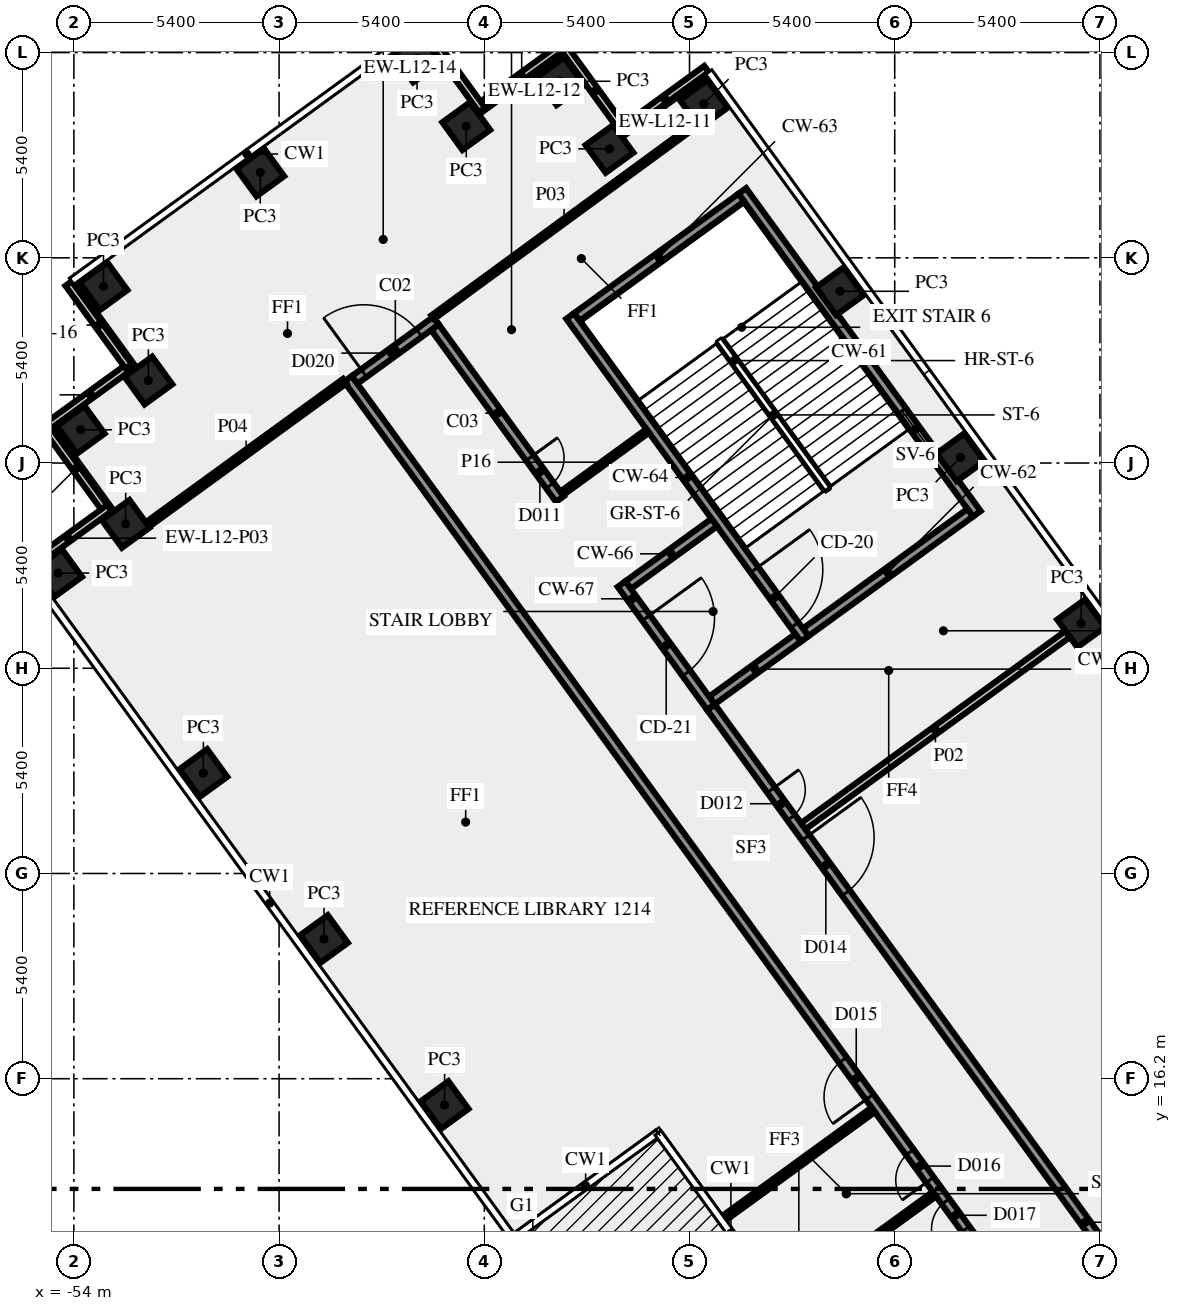
"""IFC4 building model, lengths in metres.
Left out: names, types, materials, properties, quantities, classifications, styles, units other than length and angle.
Written with IfcOpenShell. Run it as: python <this file> out.ifc"""

import sys

from ifc_helpers import new_model, si_unit, direction, frame, frame_2d, origin, origin_2d, place, context, subcontext, project, spatial, rectangle, extrude, element, fill, save


model = new_model("IFC4")
c1 = context("Model", 3, precision=1e-05, world=origin(), true_north=direction((0.0, 1.0)))
c2 = subcontext(c1, "Body", "Model", "MODEL_VIEW")
j1 = project(units=[si_unit("LENGTHUNIT", "METRE"), si_unit("PLANEANGLEUNIT", "RADIAN")], contexts=[c1])
p1 = place(None, origin())
s1 = spatial("IfcSite", under=j1, at=p1, CompositionType="ELEMENT")
p2 = place(p1, origin())
s2 = spatial("IfcBuilding", under=s1, at=p2, CompositionType="ELEMENT")
p3 = place(p2, frame((0.0, 0.0, 55.0)))
s3 = spatial("IfcBuildingStorey", under=s2, at=p3, CompositionType="ELEMENT", Elevation=55.0)
for number, where, z_axis, x_axis in (
    (1, (-27.495, 28.181, 0.0), (0.0, 0.0, 1.0), (-0.588, 0.809, 0.0)),
    (2, (-30.669, 32.55, 0.0), (0.0, 0.0, 1.0), (-0.588, 0.809, 0.0)),
    (3, (-33.843, 36.919, 0.0), (0.0, 0.0, 1.0), (-0.588, 0.809, 0.0)),
    (4, (-37.425, 41.85, 0.0), (0.0, 0.0, 1.0), (-0.588, 0.809, 0.0)),
    (5, (-39.906, 40.666, 0.0), (0.0, 0.0, 1.0), (-0.588, 0.809, 0.0)),
    (6, (-41.2, 42.445, 0.0), (0.0, 0.0, 1.0), (-0.588, 0.809, 0.0)),
    (7, (-43.675, 41.265, 0.0), (0.0, 0.0, 1.0), (-0.809, -0.588, 0.0)),
    (8, (-44.97, 43.045, 0.0), (0.0, 0.0, 1.0), (-0.809, -0.588, 0.0)),
    (9, (-49.096, 40.047, 0.0), (0.0, 0.0, 1.0), (-0.809, -0.588, 0.0)),
    (10, (-53.22, 37.05, 0.0), (0.0, 0.0, 1.0), (0.588, -0.809, 0.0)),
    (11, (-52.039, 34.571, 0.0), (0.0, 0.0, 1.0), (-0.809, -0.588, 0.0)),
    (12, (-53.82, 33.275, 0.0), (0.0, 0.0, 1.0), (0.588, -0.809, 0.0)),
    (13, (-52.636, 30.8, 0.0), (0.0, 0.0, 1.0), (-0.809, -0.588, 0.0)),
    (14, (-54.415, 29.505, 0.0), (0.0, 0.0, 1.0), (0.588, -0.809, 0.0)),
    (15, (-50.592, 24.243, 0.0), (0.0, 0.0, 1.0), (0.588, -0.809, 0.0)),
    (16, (-47.418, 19.875, 0.0), (0.0, 0.0, 1.0), (0.588, -0.809, 0.0)),
    (17, (-44.244, 15.506, 0.0), (0.0, 0.0, 1.0), (0.588, -0.809, 0.0)),
):
    element("IfcColumn", number, at=place(p3, frame(where, z_axis=z_axis, x_axis=x_axis)), inside=s3, PredefinedType="COLUMN", context=c2, shape_type="SweptSolid", body=[
        extrude(rectangle(XDim=0.9, YDim=0.9, at=origin_2d()), origin(), (0.0, 0.0, 1.0), 3.65),
    ])
p4 = place(p3, frame((-52.465, 34.987, 0.0), z_axis=(0.0, 0.0, 1.0), x_axis=(-0.809033161865, -0.587762999008, 0.0)))
e18 = element("IfcWall", 18, at=p4, inside=s3, PredefinedType="SOLIDWALL", context=c2, shape_type="SweptSolid", body=[
    extrude(rectangle(XDim=2.7, YDim=0.2, at=frame_2d((1.35, 0.0))), origin(), (0.0, 0.0, 1.0), 3.65),
])
p5 = place(p3, frame((-54.738, 33.351, 0.0), z_axis=(0.0, 0.0, 1.0), x_axis=(0.587779184282, -0.809021403008, 0.0)))
e19 = element("IfcWall", 19, at=p5, inside=s3, PredefinedType="SOLIDWALL", context=c2, shape_type="SweptSolid", body=[
    extrude(rectangle(XDim=2.7, YDim=0.2, at=frame_2d((1.35, 0.0))), origin(), (0.0, 0.0, 1.0), 3.65),
])
for number, where, z_axis, x_axis in (
    (20, (-53.063, 31.216, 0.0), (0.0, 0.0, 1.0), (-0.809, -0.588, 0.0)),
    (21, (-37.353, 42.768, 0.0), (0.0, 0.0, 1.0), (-0.809, -0.588, 0.0)),
):
    element("IfcWall", number, at=place(p3, frame(where, z_axis=z_axis, x_axis=x_axis)), inside=s3, PredefinedType="SOLIDWALL", context=c2, shape_type="SweptSolid", body=[
        extrude(rectangle(XDim=2.7, YDim=0.2, at=frame_2d((1.35, 0.0))), origin(), (0.0, 0.0, 1.0), 3.65),
    ])
p6 = place(p3, frame((-39.488, 41.094, 0.0), z_axis=(0.0, 0.0, 1.0), x_axis=(-0.587806000234, 0.809001919707, 0.0)))
e22 = element("IfcWall", 22, at=p6, inside=s3, PredefinedType="SOLIDWALL", context=c2, shape_type="SweptSolid", body=[
    extrude(rectangle(XDim=2.7, YDim=0.2, at=frame_2d((1.35, 0.0))), origin(), (0.0, 0.0, 1.0), 3.65),
])
for number, where, z_axis, x_axis in (
    (23, (-41.124, 43.366, 0.0), (0.0, 0.0, 1.0), (-0.809, -0.588, 0.0)),
    (24, (-43.259, 41.691, 0.0), (0.0, 0.0, 1.0), (-0.588, 0.809, 0.0)),
    (25, (-54.14, 37.123, 0.0), (0.0, 0.0, 1.0), (0.588, -0.809, 0.0)),
):
    element("IfcWall", number, at=place(p3, frame(where, z_axis=z_axis, x_axis=x_axis)), inside=s3, PredefinedType="SOLIDWALL", context=c2, shape_type="SweptSolid", body=[
        extrude(rectangle(XDim=2.7, YDim=0.2, at=frame_2d((1.35, 0.0))), origin(), (0.0, 0.0, 1.0), 3.65),
    ])
p7 = place(p3, frame((-30.24, 31.064, 0.0), z_axis=(0.0, 0.0, 1.0), x_axis=(-0.587795589702, 0.809009483706, 0.0)))
e26 = element("IfcWall", 26, at=p7, inside=s3, PredefinedType="SHEAR", context=c2, shape_type="SweptSolid", body=[
    extrude(rectangle(XDim=10.5, YDim=0.25, at=frame_2d((5.25, 0.0))), origin(), (0.0, 0.0, 1.0), 3.65),
])
p8 = place(p7, frame((2.15, 0.0, 1.0)))
e27 = element("IfcOpeningElement", 27, at=p8, cuts=e26, PredefinedType="OPENING", context=c2, shape_type="SweptSolid", body=[
    extrude(rectangle(XDim=1.2, YDim=1.2, at=frame_2d((0.6, 0.6))), frame((0.0, 0.135, 0.0), z_axis=(0.0, -1.0, 0.0), x_axis=(1.0, 0.0, 0.0)), (0.0, 0.0, 1.0), 0.27),
])
p9 = place(p3, frame((-30.414, 31.092, 0.0), z_axis=(0.0, 0.0, 1.0), x_axis=(-0.8089984606, -0.587810760999, 0.0)))
e28 = element("IfcWall", 28, at=p9, inside=s3, PredefinedType="SHEAR", context=c2, shape_type="SweptSolid", body=[
    extrude(rectangle(XDim=5.35, YDim=0.25, at=frame_2d((2.675, 0.0))), origin(), (0.0, 0.0, 1.0), 3.65),
])
p10 = place(p3, frame((-36.439, 39.384, 0.0), z_axis=(0.0, 0.0, 1.0), x_axis=(-0.809020161303, -0.587780893365, 0.0)))
e29 = element("IfcWall", 29, at=p10, inside=s3, PredefinedType="SHEAR", context=c2, shape_type="SweptSolid", body=[
    extrude(rectangle(XDim=5.35, YDim=0.25, at=frame_2d((2.675, 0.0))), origin(), (0.0, 0.0, 1.0), 3.65),
])
p11 = place(p3, frame((-40.942, 36.267, 0.0), z_axis=(0.0, 0.0, 1.0), x_axis=(0.587795589702, -0.809009483706, 0.0)))
e30 = element("IfcWall", 30, at=p11, inside=s3, PredefinedType="SHEAR", context=c2, shape_type="SweptSolid", body=[
    extrude(rectangle(XDim=10.5, YDim=0.25, at=frame_2d((5.25, 0.0))), origin(), (0.0, 0.0, 1.0), 3.65),
])
p12 = place(p11, frame((8.25, 0.0, 0.0)))
e31 = element("IfcOpeningElement", 31, at=p12, cuts=e30, PredefinedType="OPENING", context=c2, shape_type="SweptSolid", body=[
    extrude(rectangle(XDim=1.8, YDim=2.1, at=frame_2d((0.9, 1.05))), frame((0.0, 0.135, 0.0), z_axis=(0.0, -1.0, 0.0), x_axis=(1.0, 0.0, 0.0)), (0.0, 0.0, 1.0), 0.27),
])
for number, where, z_axis, x_axis in (
    (32, (-34.945, 27.8, 0.0), (0.0, 0.0, 1.0), (-0.809, -0.588, 0.0)),
    (33, (-37.149, 30.834, 0.0), (0.0, 0.0, 1.0), (-0.809, -0.588, 0.0)),
):
    element("IfcWall", number, at=place(p3, frame(where, z_axis=z_axis, x_axis=x_axis)), inside=s3, PredefinedType="SHEAR", context=c2, shape_type="SweptSolid", body=[
        extrude(rectangle(XDim=2.8, YDim=0.25, at=frame_2d((1.4, 0.0))), origin(), (0.0, 0.0, 1.0), 3.65),
    ])
p13 = place(p3, frame((-39.589, 29.216, 0.0), z_axis=(0.0, 0.0, 1.0), x_axis=(0.587772420479, -0.809026317077, 0.0)))
e34 = element("IfcWall", 34, at=p13, inside=s3, PredefinedType="SHEAR", context=c2, shape_type="SweptSolid", body=[
    extrude(rectangle(XDim=4.0, YDim=0.25, at=frame_2d((2.0, 0.0))), origin(), (0.0, 0.0, 1.0), 3.65),
])
p14 = place(p13, frame((1.1, 0.0, 0.0)))
e35 = element("IfcOpeningElement", 35, at=p14, cuts=e34, PredefinedType="OPENING", context=c2, shape_type="SweptSolid", body=[
    extrude(rectangle(XDim=1.8, YDim=2.1, at=frame_2d((0.9, 1.05))), frame((0.0, 0.135, 0.0), z_axis=(0.0, -1.0, 0.0), x_axis=(1.0, 0.0, 0.0)), (0.0, 0.0, 1.0), 0.27),
])
p15 = place(p3, frame((-20.531, -1.523, 0.0), z_axis=(0.0, 0.0, 1.0), x_axis=(-0.587784593204, 0.809017473231, 0.0)))
e36 = element("IfcWall", 36, at=p15, inside=s3, PredefinedType="SOLIDWALL", context=c2, shape_type="SweptSolid", body=[
    extrude(rectangle(XDim=44.67, YDim=0.25, at=frame_2d((22.335, 0.0))), origin(), (0.0, 0.0, 1.0), 3.65),
])
p16 = place(p15, frame((21.316, 0.0, 0.0)))
e37 = element("IfcOpeningElement", 37, at=p16, cuts=e36, PredefinedType="OPENING", context=c2, shape_type="SweptSolid", body=[
    extrude(rectangle(XDim=1.2, YDim=2.1, at=frame_2d((0.6, 1.05))), frame((0.0, 0.135, 0.0), z_axis=(0.0, -1.0, 0.0), x_axis=(1.0, 0.0, 0.0)), (0.0, 0.0, 1.0), 0.27),
])
p17 = place(p15, frame((17.015, 0.0, 0.0)))
e38 = element("IfcOpeningElement", 38, at=p17, cuts=e36, PredefinedType="OPENING", context=c2, shape_type="SweptSolid", body=[
    extrude(rectangle(XDim=0.9, YDim=2.1, at=frame_2d((0.45, 1.05))), frame((0.0, 0.135, 0.0), z_axis=(0.0, -1.0, 0.0), x_axis=(1.0, 0.0, 0.0)), (0.0, 0.0, 1.0), 0.27),
])
p18 = place(p15, frame((0.533, 0.0, 0.0)))
e39 = element("IfcOpeningElement", 39, at=p18, cuts=e36, PredefinedType="OPENING", context=c2, shape_type="SweptSolid", body=[
    extrude(rectangle(XDim=0.9, YDim=2.1, at=frame_2d((0.45, 1.05))), frame((0.0, 0.135, 0.0), z_axis=(0.0, -1.0, 0.0), x_axis=(1.0, 0.0, 0.0)), (0.0, 0.0, 1.0), 0.27),
])
p19 = place(p15, frame((18.616, 0.0, 0.0)))
e40 = element("IfcOpeningElement", 40, at=p19, cuts=e36, PredefinedType="OPENING", context=c2, shape_type="SweptSolid", body=[
    extrude(rectangle(XDim=0.9, YDim=2.1, at=frame_2d((0.45, 1.05))), frame((0.0, 0.135, 0.0), z_axis=(0.0, -1.0, 0.0), x_axis=(1.0, 0.0, 0.0)), (0.0, 0.0, 1.0), 0.27),
])
p20 = place(p15, frame((7.816, 0.0, 0.0)))
e41 = element("IfcOpeningElement", 41, at=p20, cuts=e36, PredefinedType="OPENING", context=c2, shape_type="SweptSolid", body=[
    extrude(rectangle(XDim=0.9, YDim=2.1, at=frame_2d((0.45, 1.05))), frame((0.0, 0.135, 0.0), z_axis=(0.0, -1.0, 0.0), x_axis=(1.0, 0.0, 0.0)), (0.0, 0.0, 1.0), 0.27),
])
p21 = place(p3, frame((-46.613, 34.588, 0.0), z_axis=(0.0, 0.0, 1.0), x_axis=(0.808994936898, 0.587815610607, 0.0)))
e42 = element("IfcWall", 42, at=p21, inside=s3, PredefinedType="SOLIDWALL", context=c2, shape_type="SweptSolid", body=[
    extrude(rectangle(XDim=2.65, YDim=0.25, at=frame_2d((1.325, 0.0))), origin(), (0.0, 0.0, 1.0), 3.65),
])
p22 = place(p21, frame((0.299, 0.0, 0.0)))
e43 = element("IfcOpeningElement", 43, at=p22, cuts=e42, PredefinedType="OPENING", context=c2, shape_type="SweptSolid", body=[
    extrude(rectangle(XDim=1.8, YDim=2.1, at=frame_2d((0.9, 1.05))), frame((0.0, 0.135, 0.0), z_axis=(0.0, -1.0, 0.0), x_axis=(1.0, 0.0, 0.0)), (0.0, 0.0, 1.0), 0.27),
])
p23 = place(p3, frame((-44.497, 35.971, 0.0), z_axis=(0.0, 0.0, 1.0), x_axis=(0.587742866856, -0.809047787501, 0.0)))
e44 = element("IfcWall", 44, at=p23, inside=s3, PredefinedType="SOLIDWALL", context=c2, shape_type="SweptSolid", body=[
    extrude(rectangle(XDim=5.586, YDim=0.25, at=frame_2d((2.793, 0.0))), origin(), (0.0, 0.0, 1.0), 3.65),
])
p24 = place(p23, frame((4.245, 0.0, 0.0)))
e45 = element("IfcOpeningElement", 45, at=p24, cuts=e44, PredefinedType="OPENING", context=c2, shape_type="SweptSolid", body=[
    extrude(rectangle(XDim=0.9, YDim=2.1, at=frame_2d((0.45, 1.05))), frame((0.0, 0.135, 0.0), z_axis=(0.0, -1.0, 0.0), x_axis=(1.0, 0.0, 0.0)), (0.0, 0.0, 1.0), 0.27),
])
p25 = place(p3, frame((-37.232, 25.972, 0.0), z_axis=(0.0, 0.0, 1.0), x_axis=(0.587786323093, -0.809016216391, 0.0)))
e46 = element("IfcWall", 46, at=p25, inside=s3, PredefinedType="SOLIDWALL", context=c2, shape_type="SweptSolid", body=[
    extrude(rectangle(XDim=33.493, YDim=0.25, at=frame_2d((16.747, 0.0))), origin(), (0.0, 0.0, 1.0), 3.65),
])
p26 = place(p25, frame((28.301, 0.0, 0.0)))
e47 = element("IfcOpeningElement", 47, at=p26, cuts=e46, PredefinedType="OPENING", context=c2, shape_type="SweptSolid", body=[
    extrude(rectangle(XDim=1.8, YDim=2.1, at=frame_2d((0.9, 1.05))), frame((0.0, 0.135, 0.0), z_axis=(0.0, -1.0, 0.0), x_axis=(1.0, 0.0, 0.0)), (0.0, 0.0, 1.0), 0.27),
])
p27 = place(p25, frame((4.235, 0.0, 0.0)))
e48 = element("IfcOpeningElement", 48, at=p27, cuts=e46, PredefinedType="OPENING", context=c2, shape_type="SweptSolid", body=[
    extrude(rectangle(XDim=1.8, YDim=2.1, at=frame_2d((0.9, 1.05))), frame((0.0, 0.135, 0.0), z_axis=(0.0, -1.0, 0.0), x_axis=(1.0, 0.0, 0.0)), (0.0, 0.0, 1.0), 0.27),
])
p28 = place(p25, frame((2.685, 0.0, 0.0)))
e49 = element("IfcOpeningElement", 49, at=p28, cuts=e46, PredefinedType="OPENING", context=c2, shape_type="SweptSolid", body=[
    extrude(rectangle(XDim=0.9, YDim=2.1, at=frame_2d((0.45, 1.05))), frame((0.0, 0.135, 0.0), z_axis=(0.0, -1.0, 0.0), x_axis=(1.0, 0.0, 0.0)), (0.0, 0.0, 1.0), 0.27),
])
p29 = place(p3, frame((-27.851, 27.897, 0.0), z_axis=(0.0, 0.0, 1.0), x_axis=(-0.809030728677, -0.587766348183, 0.0)))
e50 = element("IfcWall", 50, at=p29, inside=s3, PredefinedType="SOLIDWALL", context=c2, shape_type="SweptSolid", body=[
    extrude(rectangle(XDim=8.596, YDim=0.2, at=frame_2d((4.298, 0.0))), origin(), (0.0, 0.0, 1.0), 3.65),
])
p30 = place(p3, frame((-44.559, 36.235, 0.0), z_axis=(0.0, 0.0, 1.0), x_axis=(0.806949857155, 0.590619952286, 0.0)))
e51 = element("IfcWall", 51, at=p30, inside=s3, PredefinedType="PARTITIONING", context=c2, shape_type="SweptSolid", body=[
    extrude(rectangle(XDim=8.57, YDim=0.12, at=frame_2d((4.285, 0.0))), origin(), (0.0, 0.0, 1.0), 3.65),
])
p31 = place(p3, frame((-52.062, 30.783, 0.0), z_axis=(0.0, 0.0, 1.0), x_axis=(0.808992766665, 0.58781859743, 0.0)))
e52 = element("IfcWall", 52, at=p31, inside=s3, PredefinedType="PARTITIONING", context=c2, shape_type="SweptSolid", body=[
    extrude(rectangle(XDim=6.414, YDim=0.15, at=frame_2d((3.207, 0.0))), origin(), (0.0, 0.0, 1.0), 3.65),
])
p32 = place(p3, frame((-36.88, 12.539, 0.0), z_axis=(0.0, 0.0, 1.0), x_axis=(0.809072133835, 0.58770935185, 0.0)))
e53 = element("IfcWall", 53, at=p32, inside=s3, PredefinedType="PARTITIONING", context=c2, shape_type="SweptSolid", body=[
    extrude(rectangle(XDim=4.836, YDim=0.15, at=frame_2d((2.418, 0.0))), origin(), (0.0, 0.0, 1.0), 3.65),
])
p33 = place(p3, frame((-31.356, 13.164, 0.0), z_axis=(0.0, 0.0, 1.0), x_axis=(-0.809191339455, -0.587545212006, 0.0)))
e54 = element("IfcWall", 54, at=p33, inside=s3, PredefinedType="PARTITIONING", context=c2, shape_type="SweptSolid", body=[
    extrude(rectangle(XDim=4.937, YDim=0.15, at=frame_2d((2.468, 0.0))), origin(), (0.0, 0.0, 1.0), 3.65),
])
p34 = place(p3, frame((-41.166, 31.599, 0.0), z_axis=(0.0, 0.0, 1.0), x_axis=(0.809090262332, 0.587684394381, 0.0)))
e55 = element("IfcWall", 55, at=p34, inside=s3, PredefinedType="PARTITIONING", context=c2, shape_type="SweptSolid", body=[
    extrude(rectangle(XDim=2.801, YDim=0.12, at=frame_2d((1.4, 0.0))), origin(), (0.0, 0.0, 1.0), 3.65),
])
p35 = place(p8, origin())
e56 = element("IfcWindow", 56, at=p35, inside=s3, PartitioningType="SINGLE_PANEL", PredefinedType="WINDOW", context=c2, shape_type="SweptSolid", body=[
    extrude(rectangle(XDim=1.2, YDim=1.2, at=frame_2d((0.6, 0.6))), frame((0.0, 0.03, 0.0), z_axis=(0.0, -1.0, 0.0), x_axis=(1.0, 0.0, 0.0)), (0.0, 0.0, 1.0), 0.06),
])
fill(e27, e56)
p36 = place(p12, origin())
e57 = element("IfcDoor", 57, at=p36, inside=s3, OperationType="DOUBLE_DOOR_SINGLE_SWING", PredefinedType="DOOR", context=c2, shape_type="SweptSolid", body=[
    extrude(rectangle(XDim=1.8, YDim=2.1, at=frame_2d((0.9, 1.05))), frame((0.0, 0.025, 0.0), z_axis=(0.0, -1.0, 0.0), x_axis=(1.0, 0.0, 0.0)), (0.0, 0.0, 1.0), 0.05),
])
fill(e31, e57)
p37 = place(p14, origin())
e58 = element("IfcDoor", 58, at=p37, inside=s3, OperationType="DOUBLE_DOOR_SINGLE_SWING", PredefinedType="DOOR", context=c2, shape_type="SweptSolid", body=[
    extrude(rectangle(XDim=1.8, YDim=2.1, at=frame_2d((0.9, 1.05))), frame((0.0, 0.025, 0.0), z_axis=(0.0, -1.0, 0.0), x_axis=(1.0, 0.0, 0.0)), (0.0, 0.0, 1.0), 0.05),
])
fill(e35, e58)
p38 = place(p27, origin())
e59 = element("IfcDoor", 59, at=p38, inside=s3, OperationType="DOUBLE_DOOR_SINGLE_SWING", PredefinedType="DOOR", context=c2, shape_type="SweptSolid", body=[
    extrude(rectangle(XDim=1.8, YDim=2.1, at=frame_2d((0.9, 1.05))), frame((0.0, 0.025, 0.0), z_axis=(0.0, -1.0, 0.0), x_axis=(1.0, 0.0, 0.0)), (0.0, 0.0, 1.0), 0.05),
])
fill(e48, e59)
p39 = place(p22, origin())
e60 = element("IfcDoor", 60, at=p39, inside=s3, OperationType="DOUBLE_DOOR_SINGLE_SWING", PredefinedType="DOOR", context=c2, shape_type="SweptSolid", body=[
    extrude(rectangle(XDim=1.8, YDim=2.1, at=frame_2d((0.9, 1.05))), frame((0.0, 0.025, 0.0), z_axis=(0.0, -1.0, 0.0), x_axis=(1.0, 0.0, 0.0)), (0.0, 0.0, 1.0), 0.05),
])
fill(e43, e60)
p40 = place(p24, origin())
e61 = element("IfcDoor", 61, at=p40, inside=s3, OperationType="SINGLE_SWING_RIGHT", PredefinedType="DOOR", context=c2, shape_type="SweptSolid", body=[
    extrude(rectangle(XDim=0.9, YDim=2.1, at=frame_2d((0.45, 1.05))), frame((0.0, 0.025, 0.0), z_axis=(0.0, -1.0, 0.0), x_axis=(1.0, 0.0, 0.0)), (0.0, 0.0, 1.0), 0.05),
])
fill(e45, e61)
p41 = place(p16, origin())
e62 = element("IfcDoor", 62, at=p41, inside=s3, OperationType="SINGLE_SWING_LEFT", PredefinedType="DOOR", context=c2, shape_type="SweptSolid", body=[
    extrude(rectangle(XDim=1.2, YDim=2.1, at=frame_2d((0.6, 1.05))), frame((0.0, 0.025, 0.0), z_axis=(0.0, -1.0, 0.0), x_axis=(1.0, 0.0, 0.0)), (0.0, 0.0, 1.0), 0.05),
])
fill(e37, e62)
p42 = place(p17, origin())
e63 = element("IfcDoor", 63, at=p42, inside=s3, OperationType="SINGLE_SWING_RIGHT", PredefinedType="DOOR", context=c2, shape_type="SweptSolid", body=[
    extrude(rectangle(XDim=0.9, YDim=2.1, at=frame_2d((0.45, 1.05))), frame((0.0, 0.025, 0.0), z_axis=(0.0, -1.0, 0.0), x_axis=(1.0, 0.0, 0.0)), (0.0, 0.0, 1.0), 0.05),
])
fill(e38, e63)
p43 = place(p28, origin())
e64 = element("IfcDoor", 64, at=p43, inside=s3, OperationType="SINGLE_SWING_RIGHT", PredefinedType="DOOR", context=c2, shape_type="SweptSolid", body=[
    extrude(rectangle(XDim=0.9, YDim=2.1, at=frame_2d((0.45, 1.05))), frame((0.0, 0.025, 0.0), z_axis=(0.0, -1.0, 0.0), x_axis=(1.0, 0.0, 0.0)), (0.0, 0.0, 1.0), 0.05),
])
fill(e49, e64)
p44 = place(p19, origin())
e65 = element("IfcDoor", 65, at=p44, inside=s3, OperationType="SINGLE_SWING_LEFT", PredefinedType="DOOR", context=c2, shape_type="SweptSolid", body=[
    extrude(rectangle(XDim=0.9, YDim=2.1, at=frame_2d((0.45, 1.05))), frame((0.0, 0.025, 0.0), z_axis=(0.0, -1.0, 0.0), x_axis=(1.0, 0.0, 0.0)), (0.0, 0.0, 1.0), 0.05),
])
fill(e40, e65)
save(model, sys.argv[1])
